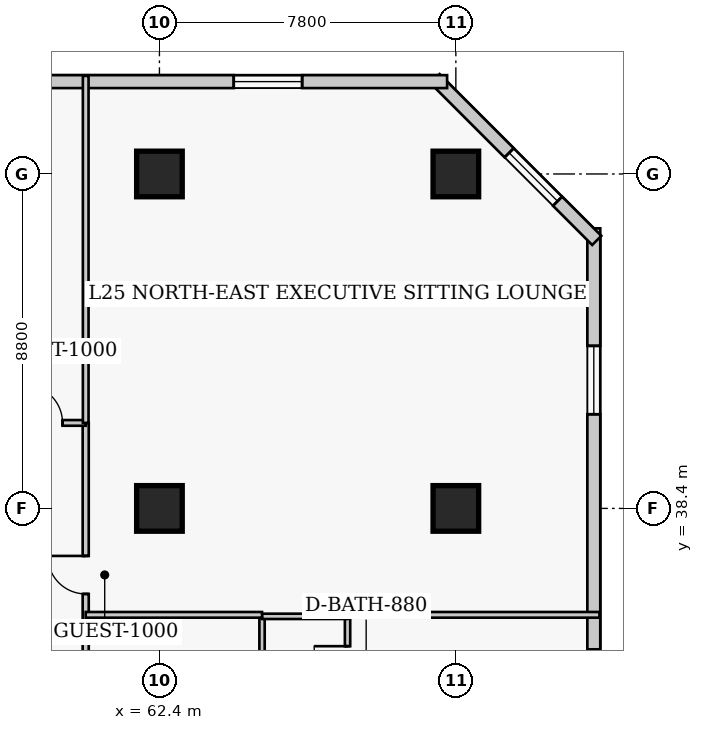
"""IFC4 building model, lengths in metres.
Left out: names, types, materials, properties, quantities, classifications, styles, units other than length and angle.
Written with IfcOpenShell. Run it as: python <this file> out.ifc"""

import sys

from ifc_helpers import new_model, si_unit, direction, frame, frame_2d, origin, origin_2d, place, context, subcontext, project, spatial, rectangle, extrude, element, fill, save


model = new_model("IFC4")
c1 = context("Model", 3, precision=1e-05, world=origin(), true_north=direction((0.0, 1.0)))
c2 = subcontext(c1, "Body", "Model", "MODEL_VIEW")
j1 = project(units=[si_unit("LENGTHUNIT", "METRE"), si_unit("PLANEANGLEUNIT", "RADIAN")], contexts=[c1])
p1 = place(None, origin())
s1 = spatial("IfcSite", under=j1, at=p1, CompositionType="ELEMENT")
p2 = place(p1, origin())
s2 = spatial("IfcBuilding", under=s1, at=p2, CompositionType="ELEMENT")
p3 = place(p2, frame((0.0, 0.0, 103.2)))
s3 = spatial("IfcBuildingStorey", under=s2, at=p3, CompositionType="ELEMENT", Elevation=103.2)
for number, where, z_axis, x_axis in (
    (1, (62.4, 38.4, 0.0), (0.0, 0.0, 1.0), (1.0, 0.0, 0.0)),
    (2, (62.4, 47.2, 0.0), (0.0, 0.0, 1.0), (1.0, 0.0, 0.0)),
    (3, (70.2, 38.4, 0.0), (0.0, 0.0, 1.0), (1.0, 0.0, 0.0)),
    (4, (70.2, 47.2, 0.0), (0.0, 0.0, 1.0), (1.0, 0.0, 0.0)),
):
    element("IfcColumn", number, at=place(p3, frame(where, z_axis=z_axis, x_axis=x_axis)), inside=s3, PredefinedType="COLUMN", context=c2, shape_type="SweptSolid", body=[
        extrude(rectangle(XDim=1.2, YDim=1.2, at=origin_2d()), origin(), (0.0, 0.0, 1.0), 3.8),
    ])
p4 = place(p3, frame((73.83, 13.83, 0.0), z_axis=(0.0, 0.0, 1.0), x_axis=(0.0, 1.0, 0.0)))
e5 = element("IfcWall", 5, at=p4, inside=s3, PredefinedType="SOLIDWALL", context=c2, shape_type="SweptSolid", body=[
    extrude(rectangle(XDim=31.94, YDim=0.34, at=frame_2d((15.97, 0.0))), origin(), (0.0, 0.0, 1.0), 3.54),
])
p5 = place(p4, frame((3.093, 0.0, 0.85)))
e6 = element("IfcOpeningElement", 6, at=p5, cuts=e5, PredefinedType="OPENING", context=c2, shape_type="SweptSolid", body=[
    extrude(rectangle(XDim=1.8, YDim=1.8, at=frame_2d((0.9, 0.9))), frame((0.0, 0.18, 0.0), z_axis=(0.0, -1.0, 0.0), x_axis=(1.0, 0.0, 0.0)), (0.0, 0.0, 1.0), 0.36),
])
p6 = place(p4, frame((11.077, 0.0, 0.85)))
e7 = element("IfcOpeningElement", 7, at=p6, cuts=e5, PredefinedType="OPENING", context=c2, shape_type="SweptSolid", body=[
    extrude(rectangle(XDim=1.8, YDim=1.8, at=frame_2d((0.9, 0.9))), frame((0.0, 0.18, 0.0), z_axis=(0.0, -1.0, 0.0), x_axis=(1.0, 0.0, 0.0)), (0.0, 0.0, 1.0), 0.36),
])
p7 = place(p4, frame((19.062, 0.0, 0.85)))
e8 = element("IfcOpeningElement", 8, at=p7, cuts=e5, PredefinedType="OPENING", context=c2, shape_type="SweptSolid", body=[
    extrude(rectangle(XDim=1.8, YDim=1.8, at=frame_2d((0.9, 0.9))), frame((0.0, 0.18, 0.0), z_axis=(0.0, -1.0, 0.0), x_axis=(1.0, 0.0, 0.0)), (0.0, 0.0, 1.0), 0.36),
])
p8 = place(p4, frame((27.048, 0.0, 0.85)))
e9 = element("IfcOpeningElement", 9, at=p8, cuts=e5, PredefinedType="OPENING", context=c2, shape_type="SweptSolid", body=[
    extrude(rectangle(XDim=1.8, YDim=1.8, at=frame_2d((0.9, 0.9))), frame((0.0, 0.18, 0.0), z_axis=(0.0, -1.0, 0.0), x_axis=(1.0, 0.0, 0.0)), (0.0, 0.0, 1.0), 0.36),
])
p9 = place(p3, frame((73.908, 45.451, 0.0), z_axis=(0.0, 0.0, 1.0), x_axis=(-0.707106781187, 0.707106781187, 0.0)))
e10 = element("IfcWall", 10, at=p9, inside=s3, PredefinedType="SOLIDWALL", context=c2, shape_type="SweptSolid", body=[
    extrude(rectangle(XDim=6.02, YDim=0.34, at=frame_2d((3.01, 0.0))), origin(), (0.0, 0.0, 1.0), 3.54),
])
p10 = place(p9, frame((1.46, 0.0, 0.85)))
e11 = element("IfcOpeningElement", 11, at=p10, cuts=e10, PredefinedType="OPENING", context=c2, shape_type="SweptSolid", body=[
    extrude(rectangle(XDim=1.8, YDim=1.8, at=frame_2d((0.9, 0.9))), frame((0.0, 0.18, 0.0), z_axis=(0.0, -1.0, 0.0), x_axis=(1.0, 0.0, 0.0)), (0.0, 0.0, 1.0), 0.36),
])
p11 = place(p3, frame((69.97, 49.63, 0.0), z_axis=(0.0, 0.0, 1.0), x_axis=(-1.0, 0.0, 0.0)))
e12 = element("IfcWall", 12, at=p11, inside=s3, PredefinedType="SOLIDWALL", context=c2, shape_type="SweptSolid", body=[
    extrude(rectangle(XDim=28.29, YDim=0.34, at=frame_2d((14.145, 0.0))), origin(), (0.0, 0.0, 1.0), 3.54),
])
p12 = place(p11, frame((3.815, 0.0, 0.85)))
e13 = element("IfcOpeningElement", 13, at=p12, cuts=e12, PredefinedType="OPENING", context=c2, shape_type="SweptSolid", body=[
    extrude(rectangle(XDim=1.8, YDim=1.8, at=frame_2d((0.9, 0.9))), frame((0.0, 0.18, 0.0), z_axis=(0.0, -1.0, 0.0), x_axis=(1.0, 0.0, 0.0)), (0.0, 0.0, 1.0), 0.36),
])
p13 = place(p11, frame((13.245, 0.0, 0.85)))
e14 = element("IfcOpeningElement", 14, at=p13, cuts=e12, PredefinedType="OPENING", context=c2, shape_type="SweptSolid", body=[
    extrude(rectangle(XDim=1.8, YDim=1.8, at=frame_2d((0.9, 0.9))), frame((0.0, 0.18, 0.0), z_axis=(0.0, -1.0, 0.0), x_axis=(1.0, 0.0, 0.0)), (0.0, 0.0, 1.0), 0.36),
])
p14 = place(p11, frame((22.675, 0.0, 0.85)))
e15 = element("IfcOpeningElement", 15, at=p14, cuts=e12, PredefinedType="OPENING", context=c2, shape_type="SweptSolid", body=[
    extrude(rectangle(XDim=1.8, YDim=1.8, at=frame_2d((0.9, 0.9))), frame((0.0, 0.18, 0.0), z_axis=(0.0, -1.0, 0.0), x_axis=(1.0, 0.0, 0.0)), (0.0, 0.0, 1.0), 0.36),
])
p15 = place(p3, frame((60.46, 11.85, 0.0), z_axis=(0.0, 0.0, 1.0), x_axis=(0.0, 1.0, 0.0)))
e16 = element("IfcWall", 16, at=p15, inside=s3, PredefinedType="PARTITIONING", context=c2, shape_type="SweptSolid", body=[
    extrude(rectangle(XDim=28.8, YDim=0.16, at=frame_2d((14.4, 0.0))), origin(), (0.0, 0.0, 1.0), 3.54),
])
p16 = place(p15, frame((3.6, 0.0, 0.0)))
e17 = element("IfcOpeningElement", 17, at=p16, cuts=e16, PredefinedType="OPENING", context=c2, shape_type="SweptSolid", body=[
    extrude(rectangle(XDim=0.95, YDim=2.1, at=frame_2d((0.475, 1.05))), frame((0.0, 0.09, 0.0), z_axis=(0.0, -1.0, 0.0), x_axis=(1.0, 0.0, 0.0)), (0.0, 0.0, 1.0), 0.18),
])
p17 = place(p15, frame((12.075, 0.0, 0.0)))
e18 = element("IfcOpeningElement", 18, at=p17, cuts=e16, PredefinedType="OPENING", context=c2, shape_type="SweptSolid", body=[
    extrude(rectangle(XDim=0.95, YDim=2.1, at=frame_2d((0.475, 1.05))), frame((0.0, 0.09, 0.0), z_axis=(0.0, -1.0, 0.0), x_axis=(1.0, 0.0, 0.0)), (0.0, 0.0, 1.0), 0.18),
])
p18 = place(p15, frame((19.875, 0.0, 0.0)))
e19 = element("IfcOpeningElement", 19, at=p18, cuts=e16, PredefinedType="OPENING", context=c2, shape_type="SweptSolid", body=[
    extrude(rectangle(XDim=0.95, YDim=2.1, at=frame_2d((0.475, 1.05))), frame((0.0, 0.09, 0.0), z_axis=(0.0, -1.0, 0.0), x_axis=(1.0, 0.0, 0.0)), (0.0, 0.0, 1.0), 0.18),
])
p19 = place(p15, frame((24.3, 0.0, 0.0)))
e20 = element("IfcOpeningElement", 20, at=p19, cuts=e16, PredefinedType="OPENING", context=c2, shape_type="SweptSolid", body=[
    extrude(rectangle(XDim=1.0, YDim=2.15, at=frame_2d((0.5, 1.075))), frame((0.0, 0.09, 0.0), z_axis=(0.0, -1.0, 0.0), x_axis=(1.0, 0.0, 0.0)), (0.0, 0.0, 1.0), 0.18),
])
p20 = place(p3, frame((56.8, 40.65, 0.0), z_axis=(0.0, 0.0, 1.0), x_axis=(1.0, 0.0, 0.0)))
e21 = element("IfcWall", 21, at=p20, inside=s3, PredefinedType="PARTITIONING", context=c2, shape_type="SweptSolid", body=[
    extrude(rectangle(XDim=3.66, YDim=0.15, at=frame_2d((1.83, 0.0))), origin(), (0.0, 0.0, 1.0), 3.54),
])
p21 = place(p20, frame((2.05, 0.0, 0.0)))
e22 = element("IfcOpeningElement", 22, at=p21, cuts=e21, PredefinedType="OPENING", context=c2, shape_type="SweptSolid", body=[
    extrude(rectangle(XDim=1.0, YDim=2.15, at=frame_2d((0.5, 1.075))), frame((0.0, 0.085, 0.0), z_axis=(0.0, -1.0, 0.0), x_axis=(1.0, 0.0, 0.0)), (0.0, 0.0, 1.0), 0.17),
])
p22 = place(p3, frame((60.46, 40.65, 0.0), z_axis=(0.0, 0.0, 1.0), x_axis=(0.0, 1.0, 0.0)))
e23 = element("IfcWall", 23, at=p22, inside=s3, PredefinedType="PARTITIONING", context=c2, shape_type="SweptSolid", body=[
    extrude(rectangle(XDim=9.13, YDim=0.15, at=frame_2d((4.565, 0.0))), origin(), (0.0, 0.0, 1.0), 3.54),
])
p23 = place(p3, frame((65.1, 33.11, 0.0), z_axis=(0.0, 0.0, 1.0), x_axis=(0.0, 1.0, 0.0)))
e24 = element("IfcWall", 24, at=p23, inside=s3, PredefinedType="PLUMBINGWALL", context=c2, shape_type="SweptSolid", body=[
    extrude(rectangle(XDim=2.45, YDim=0.14, at=frame_2d((1.225, 0.0))), origin(), (0.0, 0.0, 1.0), 3.54),
])
p24 = place(p3, frame((67.35, 33.11, 0.0), z_axis=(0.0, 0.0, 1.0), x_axis=(0.0, 1.0, 0.0)))
e25 = element("IfcWall", 25, at=p24, inside=s3, PredefinedType="PLUMBINGWALL", context=c2, shape_type="SweptSolid", body=[
    extrude(rectangle(XDim=2.45, YDim=0.14, at=frame_2d((1.225, 0.0))), origin(), (0.0, 0.0, 1.0), 3.54),
])
p25 = place(p24, frame((0.785, 0.0, 0.0)))
e26 = element("IfcOpeningElement", 26, at=p25, cuts=e25, PredefinedType="OPENING", context=c2, shape_type="SweptSolid", body=[
    extrude(rectangle(XDim=0.88, YDim=2.05, at=frame_2d((0.44, 1.025))), frame((0.0, 0.08, 0.0), z_axis=(0.0, -1.0, 0.0), x_axis=(1.0, 0.0, 0.0)), (0.0, 0.0, 1.0), 0.16),
])
p26 = place(p3, frame((65.1, 35.56, 0.0), z_axis=(0.0, 0.0, 1.0), x_axis=(1.0, 0.0, 0.0)))
e27 = element("IfcWall", 27, at=p26, inside=s3, PredefinedType="PLUMBINGWALL", context=c2, shape_type="SweptSolid", body=[
    extrude(rectangle(XDim=2.25, YDim=0.14, at=frame_2d((1.125, 0.0))), origin(), (0.0, 0.0, 1.0), 3.54),
])
p27 = place(p3, frame((60.46, 35.6, 0.0), z_axis=(0.0, 0.0, 1.0), x_axis=(1.0, 0.0, 0.0)))
e28 = element("IfcWall", 28, at=p27, inside=s3, PredefinedType="PARTITIONING", context=c2, shape_type="SweptSolid", body=[
    extrude(rectangle(XDim=4.64, YDim=0.15, at=frame_2d((2.32, 0.0))), origin(), (0.0, 0.0, 1.0), 3.54),
])
p28 = place(p3, frame((67.35, 35.6, 0.0), z_axis=(0.0, 0.0, 1.0), x_axis=(1.0, 0.0, 0.0)))
e29 = element("IfcWall", 29, at=p28, inside=s3, PredefinedType="PARTITIONING", context=c2, shape_type="SweptSolid", body=[
    extrude(rectangle(XDim=6.63, YDim=0.15, at=frame_2d((3.315, 0.0))), origin(), (0.0, 0.0, 1.0), 3.54),
])
p29 = place(p7, origin())
e30 = element("IfcWindow", 30, at=p29, inside=s3, PartitioningType="SINGLE_PANEL", PredefinedType="WINDOW", context=c2, shape_type="SweptSolid", body=[
    extrude(rectangle(XDim=1.8, YDim=1.8, at=frame_2d((0.9, 0.9))), frame((0.0, 0.03, 0.0), z_axis=(0.0, -1.0, 0.0), x_axis=(1.0, 0.0, 0.0)), (0.0, 0.0, 1.0), 0.06),
])
fill(e8, e30)
p30 = place(p8, origin())
e31 = element("IfcWindow", 31, at=p30, inside=s3, PartitioningType="SINGLE_PANEL", PredefinedType="WINDOW", context=c2, shape_type="SweptSolid", body=[
    extrude(rectangle(XDim=1.8, YDim=1.8, at=frame_2d((0.9, 0.9))), frame((0.0, 0.03, 0.0), z_axis=(0.0, -1.0, 0.0), x_axis=(1.0, 0.0, 0.0)), (0.0, 0.0, 1.0), 0.06),
])
fill(e9, e31)
p31 = place(p10, origin())
e32 = element("IfcWindow", 32, at=p31, inside=s3, PartitioningType="SINGLE_PANEL", PredefinedType="WINDOW", context=c2, shape_type="SweptSolid", body=[
    extrude(rectangle(XDim=1.8, YDim=1.8, at=frame_2d((0.9, 0.9))), frame((0.0, 0.03, 0.0), z_axis=(0.0, -1.0, 0.0), x_axis=(1.0, 0.0, 0.0)), (0.0, 0.0, 1.0), 0.06),
])
fill(e11, e32)
p32 = place(p12, origin())
e33 = element("IfcWindow", 33, at=p32, inside=s3, PartitioningType="SINGLE_PANEL", PredefinedType="WINDOW", context=c2, shape_type="SweptSolid", body=[
    extrude(rectangle(XDim=1.8, YDim=1.8, at=frame_2d((0.9, 0.9))), frame((0.0, 0.03, 0.0), z_axis=(0.0, -1.0, 0.0), x_axis=(1.0, 0.0, 0.0)), (0.0, 0.0, 1.0), 0.06),
])
fill(e13, e33)
p33 = place(p21, origin())
e34 = element("IfcDoor", 34, at=p33, inside=s3, OperationType="SINGLE_SWING_LEFT", PredefinedType="DOOR", context=c2, shape_type="SweptSolid", body=[
    extrude(rectangle(XDim=1.0, YDim=2.15, at=frame_2d((0.5, 1.075))), frame((0.0, 0.025, 0.0), z_axis=(0.0, -1.0, 0.0), x_axis=(1.0, 0.0, 0.0)), (0.0, 0.0, 1.0), 0.05),
])
fill(e22, e34)
p34 = place(p25, origin())
e35 = element("IfcDoor", 35, at=p34, inside=s3, OperationType="SINGLE_SWING_RIGHT", PredefinedType="DOOR", context=c2, shape_type="SweptSolid", body=[
    extrude(rectangle(XDim=0.88, YDim=2.05, at=frame_2d((0.44, 1.025))), frame((0.0, 0.025, 0.0), z_axis=(0.0, -1.0, 0.0), x_axis=(1.0, 0.0, 0.0)), (0.0, 0.0, 1.0), 0.05),
])
fill(e26, e35)
p35 = place(p19, origin())
e36 = element("IfcDoor", 36, at=p35, inside=s3, OperationType="SINGLE_SWING_RIGHT", PredefinedType="DOOR", context=c2, shape_type="SweptSolid", body=[
    extrude(rectangle(XDim=1.0, YDim=2.15, at=frame_2d((0.5, 1.075))), frame((0.0, 0.025, 0.0), z_axis=(0.0, -1.0, 0.0), x_axis=(1.0, 0.0, 0.0)), (0.0, 0.0, 1.0), 0.05),
])
fill(e20, e36)
save(model, sys.argv[1])
